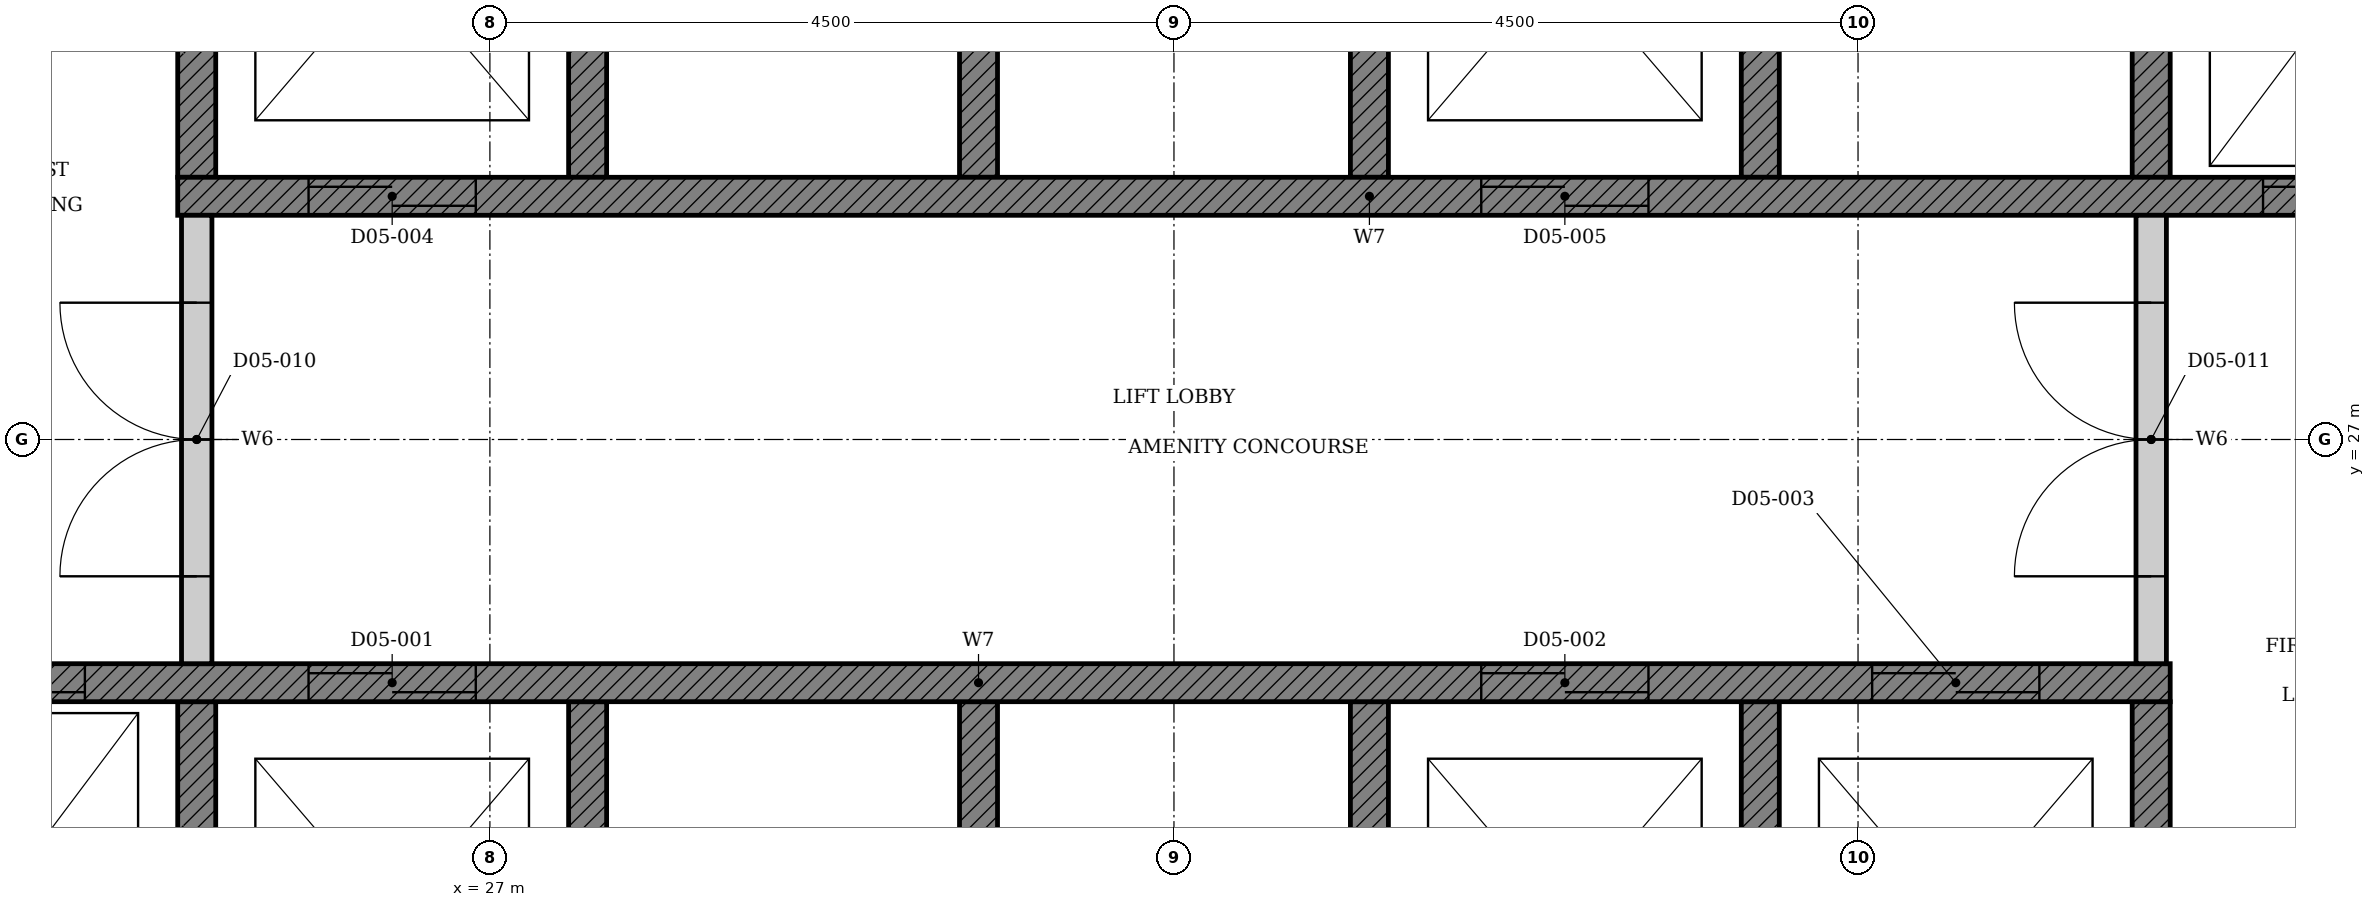
"""IFC4 building model, lengths in metres.
Left out: names, types, materials, properties, quantities, classifications, styles, units other than length and angle.
Written with IfcOpenShell. Run it as: python <this file> out.ifc"""

import sys

from ifc_helpers import new_model, si_unit, direction, frame, frame_2d, origin, place, context, subcontext, project, spatial, polyline, rectangle, outline, extrude, element, fill, save


model = new_model("IFC4")
c1 = context("Model", 3, precision=1e-05, world=origin(), true_north=direction((0.0, 1.0)))
c2 = subcontext(c1, "Body", "Model", "MODEL_VIEW")
j1 = project(units=[si_unit("LENGTHUNIT", "METRE"), si_unit("PLANEANGLEUNIT", "RADIAN")], contexts=[c1])
p1 = place(None, origin())
s1 = spatial("IfcSite", under=j1, at=p1, CompositionType="ELEMENT")
p2 = place(p1, origin())
s2 = spatial("IfcBuilding", under=s1, at=p2, CompositionType="ELEMENT")
p3 = place(p2, frame((0.0, 0.0, 28.8)))
s3 = spatial("IfcBuildingStorey", under=s2, at=p3, CompositionType="ELEMENT", Elevation=28.8)
p4 = place(p3, origin())
e1 = element("IfcWall", 1, at=p4, inside=s3, PredefinedType="SHEAR", context=c2, shape_type="SweptSolid", body=[
    extrude(outline(polyline([(22.375, 22.35), (38.053, 22.35), (38.053, 25.275), (37.803, 25.275), (37.803, 22.65), (35.482, 22.65), (35.482, 25.275), (35.232, 25.275), (35.232, 22.65), (32.911, 22.65), (32.911, 25.275), (32.661, 25.275), (32.661, 22.65), (30.339, 22.65), (30.339, 25.275), (30.089, 25.275), (30.089, 22.65), (27.768, 22.65), (27.768, 25.275), (27.518, 25.275), (27.518, 22.65), (25.197, 22.65), (25.197, 25.275), (24.947, 25.275), (24.947, 22.65), (22.625, 22.65), (22.625, 25.275), (22.375, 25.275), (22.375, 22.35)])), origin(), (0.0, 0.0, 1.0), 4.5),
])
p5 = place(p3, origin())
e2 = element("IfcWall", 2, at=p5, inside=s3, PredefinedType="SHEAR", context=c2, shape_type="SweptSolid", body=[
    extrude(outline(polyline([(24.947, 28.725), (25.197, 28.725), (25.197, 31.35), (27.518, 31.35), (27.518, 28.725), (27.768, 28.725), (27.768, 31.35), (30.089, 31.35), (30.089, 28.725), (30.339, 28.725), (30.339, 31.35), (32.661, 31.35), (32.661, 28.725), (32.911, 28.725), (32.911, 31.35), (35.232, 31.35), (35.232, 28.725), (35.482, 28.725), (35.482, 31.35), (37.803, 31.35), (37.803, 28.725), (38.053, 28.725), (38.053, 31.35), (40.375, 31.35), (40.375, 28.725), (40.625, 28.725), (40.625, 31.65), (24.947, 31.65), (24.947, 28.725)])), origin(), (0.0, 0.0, 1.0), 4.5),
])
p6 = place(p3, frame((22.375, 25.4, 0.0), z_axis=(0.0, 0.0, 1.0), x_axis=(1.0, 0.0, 0.0)))
e3 = element("IfcWall", 3, at=p6, inside=s3, PredefinedType="SHEAR", context=c2, shape_type="SweptSolid", body=[
    extrude(rectangle(XDim=15.678, YDim=0.25, at=frame_2d((7.839, 0.0))), origin(), (0.0, 0.0, 1.0), 4.5),
])
p7 = place(p6, frame((3.432, 0.0, 0.0)))
e4 = element("IfcOpeningElement", 4, at=p7, cuts=e3, PredefinedType="OPENING", context=c2, shape_type="SweptSolid", body=[
    extrude(rectangle(XDim=1.1, YDim=2.1, at=frame_2d((0.55, 1.05))), frame((0.0, 0.135, 0.0), z_axis=(0.0, -1.0, 0.0), x_axis=(1.0, 0.0, 0.0)), (0.0, 0.0, 1.0), 0.27),
])
p8 = place(p6, frame((11.146, 0.0, 0.0)))
e5 = element("IfcOpeningElement", 5, at=p8, cuts=e3, PredefinedType="OPENING", context=c2, shape_type="SweptSolid", body=[
    extrude(rectangle(XDim=1.1, YDim=2.1, at=frame_2d((0.55, 1.05))), frame((0.0, 0.135, 0.0), z_axis=(0.0, -1.0, 0.0), x_axis=(1.0, 0.0, 0.0)), (0.0, 0.0, 1.0), 0.27),
])
p9 = place(p6, frame((13.718, 0.0, 0.0)))
e6 = element("IfcOpeningElement", 6, at=p9, cuts=e3, PredefinedType="OPENING", context=c2, shape_type="SweptSolid", body=[
    extrude(rectangle(XDim=1.1, YDim=2.1, at=frame_2d((0.55, 1.05))), frame((0.0, 0.135, 0.0), z_axis=(0.0, -1.0, 0.0), x_axis=(1.0, 0.0, 0.0)), (0.0, 0.0, 1.0), 0.27),
])
p10 = place(p6, frame((0.861, 0.0, 0.0)))
e7 = element("IfcOpeningElement", 7, at=p10, cuts=e3, PredefinedType="OPENING", context=c2, shape_type="SweptSolid", body=[
    extrude(rectangle(XDim=1.1, YDim=2.1, at=frame_2d((0.55, 1.05))), frame((0.0, 0.135, 0.0), z_axis=(0.0, -1.0, 0.0), x_axis=(1.0, 0.0, 0.0)), (0.0, 0.0, 1.0), 0.27),
])
p11 = place(p3, frame((24.947, 28.6, 0.0), z_axis=(0.0, 0.0, 1.0), x_axis=(1.0, 0.0, 0.0)))
e8 = element("IfcWall", 8, at=p11, inside=s3, PredefinedType="SHEAR", context=c2, shape_type="SweptSolid", body=[
    extrude(rectangle(XDim=15.678, YDim=0.25, at=frame_2d((7.839, 0.0))), origin(), (0.0, 0.0, 1.0), 4.5),
])
p12 = place(p11, frame((0.861, 0.0, 0.0)))
e9 = element("IfcOpeningElement", 9, at=p12, cuts=e8, PredefinedType="OPENING", context=c2, shape_type="SweptSolid", body=[
    extrude(rectangle(XDim=1.1, YDim=2.1, at=frame_2d((0.55, 1.05))), frame((0.0, 0.135, 0.0), z_axis=(0.0, -1.0, 0.0), x_axis=(1.0, 0.0, 0.0)), (0.0, 0.0, 1.0), 0.27),
])
p13 = place(p11, frame((8.575, 0.0, 0.0)))
e10 = element("IfcOpeningElement", 10, at=p13, cuts=e8, PredefinedType="OPENING", context=c2, shape_type="SweptSolid", body=[
    extrude(rectangle(XDim=1.1, YDim=2.1, at=frame_2d((0.55, 1.05))), frame((0.0, 0.135, 0.0), z_axis=(0.0, -1.0, 0.0), x_axis=(1.0, 0.0, 0.0)), (0.0, 0.0, 1.0), 0.27),
])
p14 = place(p11, frame((13.718, 0.0, 0.0)))
e11 = element("IfcOpeningElement", 11, at=p14, cuts=e8, PredefinedType="OPENING", context=c2, shape_type="SweptSolid", body=[
    extrude(rectangle(XDim=1.1, YDim=2.1, at=frame_2d((0.55, 1.05))), frame((0.0, 0.135, 0.0), z_axis=(0.0, -1.0, 0.0), x_axis=(1.0, 0.0, 0.0)), (0.0, 0.0, 1.0), 0.27),
])
p15 = place(p3, frame((25.072, 25.525, 0.0), z_axis=(0.0, 0.0, 1.0), x_axis=(0.0, 1.0, 0.0)))
e12 = element("IfcWall", 12, at=p15, inside=s3, PredefinedType="PARTITIONING", context=c2, shape_type="SweptSolid", body=[
    extrude(rectangle(XDim=2.95, YDim=0.2, at=frame_2d((1.475, 0.0))), origin(), (0.0, 0.0, 1.0), 4.5),
])
p16 = place(p15, frame((0.575, 0.0, 0.0)))
e13 = element("IfcOpeningElement", 13, at=p16, cuts=e12, PredefinedType="OPENING", context=c2, shape_type="SweptSolid", body=[
    extrude(rectangle(XDim=1.8, YDim=2.1, at=frame_2d((0.9, 1.05))), frame((0.0, 0.11, 0.0), z_axis=(0.0, -1.0, 0.0), x_axis=(1.0, 0.0, 0.0)), (0.0, 0.0, 1.0), 0.22),
])
p17 = place(p3, frame((37.928, 25.525, 0.0), z_axis=(0.0, 0.0, 1.0), x_axis=(0.0, 1.0, 0.0)))
e14 = element("IfcWall", 14, at=p17, inside=s3, PredefinedType="PARTITIONING", context=c2, shape_type="SweptSolid", body=[
    extrude(rectangle(XDim=2.95, YDim=0.2, at=frame_2d((1.475, 0.0))), origin(), (0.0, 0.0, 1.0), 4.5),
])
p18 = place(p17, frame((0.575, 0.0, 0.0)))
e15 = element("IfcOpeningElement", 15, at=p18, cuts=e14, PredefinedType="OPENING", context=c2, shape_type="SweptSolid", body=[
    extrude(rectangle(XDim=1.8, YDim=2.1, at=frame_2d((0.9, 1.05))), frame((0.0, 0.11, 0.0), z_axis=(0.0, -1.0, 0.0), x_axis=(1.0, 0.0, 0.0)), (0.0, 0.0, 1.0), 0.22),
])
p19 = place(p7, origin())
e16 = element("IfcDoor", 16, at=p19, inside=s3, OperationType="DOUBLE_DOOR_SLIDING", PredefinedType="DOOR", context=c2, shape_type="SweptSolid", body=[
    extrude(rectangle(XDim=1.1, YDim=2.1, at=frame_2d((0.55, 1.05))), frame((0.0, 0.025, 0.0), z_axis=(0.0, -1.0, 0.0), x_axis=(1.0, 0.0, 0.0)), (0.0, 0.0, 1.0), 0.05),
])
fill(e4, e16)
p20 = place(p8, origin())
e17 = element("IfcDoor", 17, at=p20, inside=s3, OperationType="DOUBLE_DOOR_SLIDING", PredefinedType="DOOR", context=c2, shape_type="SweptSolid", body=[
    extrude(rectangle(XDim=1.1, YDim=2.1, at=frame_2d((0.55, 1.05))), frame((0.0, 0.025, 0.0), z_axis=(0.0, -1.0, 0.0), x_axis=(1.0, 0.0, 0.0)), (0.0, 0.0, 1.0), 0.05),
])
fill(e5, e17)
p21 = place(p9, origin())
e18 = element("IfcDoor", 18, at=p21, inside=s3, OperationType="DOUBLE_DOOR_SLIDING", PredefinedType="DOOR", context=c2, shape_type="SweptSolid", body=[
    extrude(rectangle(XDim=1.1, YDim=2.1, at=frame_2d((0.55, 1.05))), frame((0.0, 0.025, 0.0), z_axis=(0.0, -1.0, 0.0), x_axis=(1.0, 0.0, 0.0)), (0.0, 0.0, 1.0), 0.05),
])
fill(e6, e18)
p22 = place(p12, origin())
e19 = element("IfcDoor", 19, at=p22, inside=s3, OperationType="DOUBLE_DOOR_SLIDING", PredefinedType="DOOR", context=c2, shape_type="SweptSolid", body=[
    extrude(rectangle(XDim=1.1, YDim=2.1, at=frame_2d((0.55, 1.05))), frame((0.0, 0.025, 0.0), z_axis=(0.0, -1.0, 0.0), x_axis=(1.0, 0.0, 0.0)), (0.0, 0.0, 1.0), 0.05),
])
fill(e9, e19)
p23 = place(p13, origin())
e20 = element("IfcDoor", 20, at=p23, inside=s3, OperationType="DOUBLE_DOOR_SLIDING", PredefinedType="DOOR", context=c2, shape_type="SweptSolid", body=[
    extrude(rectangle(XDim=1.1, YDim=2.1, at=frame_2d((0.55, 1.05))), frame((0.0, 0.025, 0.0), z_axis=(0.0, -1.0, 0.0), x_axis=(1.0, 0.0, 0.0)), (0.0, 0.0, 1.0), 0.05),
])
fill(e10, e20)
p24 = place(p10, origin())
e21 = element("IfcDoor", 21, at=p24, inside=s3, OperationType="DOUBLE_DOOR_SLIDING", PredefinedType="DOOR", context=c2, shape_type="SweptSolid", body=[
    extrude(rectangle(XDim=1.1, YDim=2.1, at=frame_2d((0.55, 1.05))), frame((0.0, 0.025, 0.0), z_axis=(0.0, -1.0, 0.0), x_axis=(1.0, 0.0, 0.0)), (0.0, 0.0, 1.0), 0.05),
])
fill(e7, e21)
p25 = place(p14, origin())
e22 = element("IfcDoor", 22, at=p25, inside=s3, OperationType="DOUBLE_DOOR_SLIDING", PredefinedType="DOOR", context=c2, shape_type="SweptSolid", body=[
    extrude(rectangle(XDim=1.1, YDim=2.1, at=frame_2d((0.55, 1.05))), frame((0.0, 0.025, 0.0), z_axis=(0.0, -1.0, 0.0), x_axis=(1.0, 0.0, 0.0)), (0.0, 0.0, 1.0), 0.05),
])
fill(e11, e22)
p26 = place(p16, origin())
e23 = element("IfcDoor", 23, at=p26, inside=s3, OperationType="DOUBLE_DOOR_SINGLE_SWING", PredefinedType="DOOR", context=c2, shape_type="SweptSolid", body=[
    extrude(rectangle(XDim=1.8, YDim=2.1, at=frame_2d((0.9, 1.05))), frame((0.0, 0.025, 0.0), z_axis=(0.0, -1.0, 0.0), x_axis=(1.0, 0.0, 0.0)), (0.0, 0.0, 1.0), 0.05),
])
fill(e13, e23)
p27 = place(p18, origin())
e24 = element("IfcDoor", 24, at=p27, inside=s3, OperationType="DOUBLE_DOOR_SINGLE_SWING", PredefinedType="DOOR", context=c2, shape_type="SweptSolid", body=[
    extrude(rectangle(XDim=1.8, YDim=2.1, at=frame_2d((0.9, 1.05))), frame((0.0, 0.025, 0.0), z_axis=(0.0, -1.0, 0.0), x_axis=(1.0, 0.0, 0.0)), (0.0, 0.0, 1.0), 0.05),
])
fill(e15, e24)
save(model, sys.argv[1])
